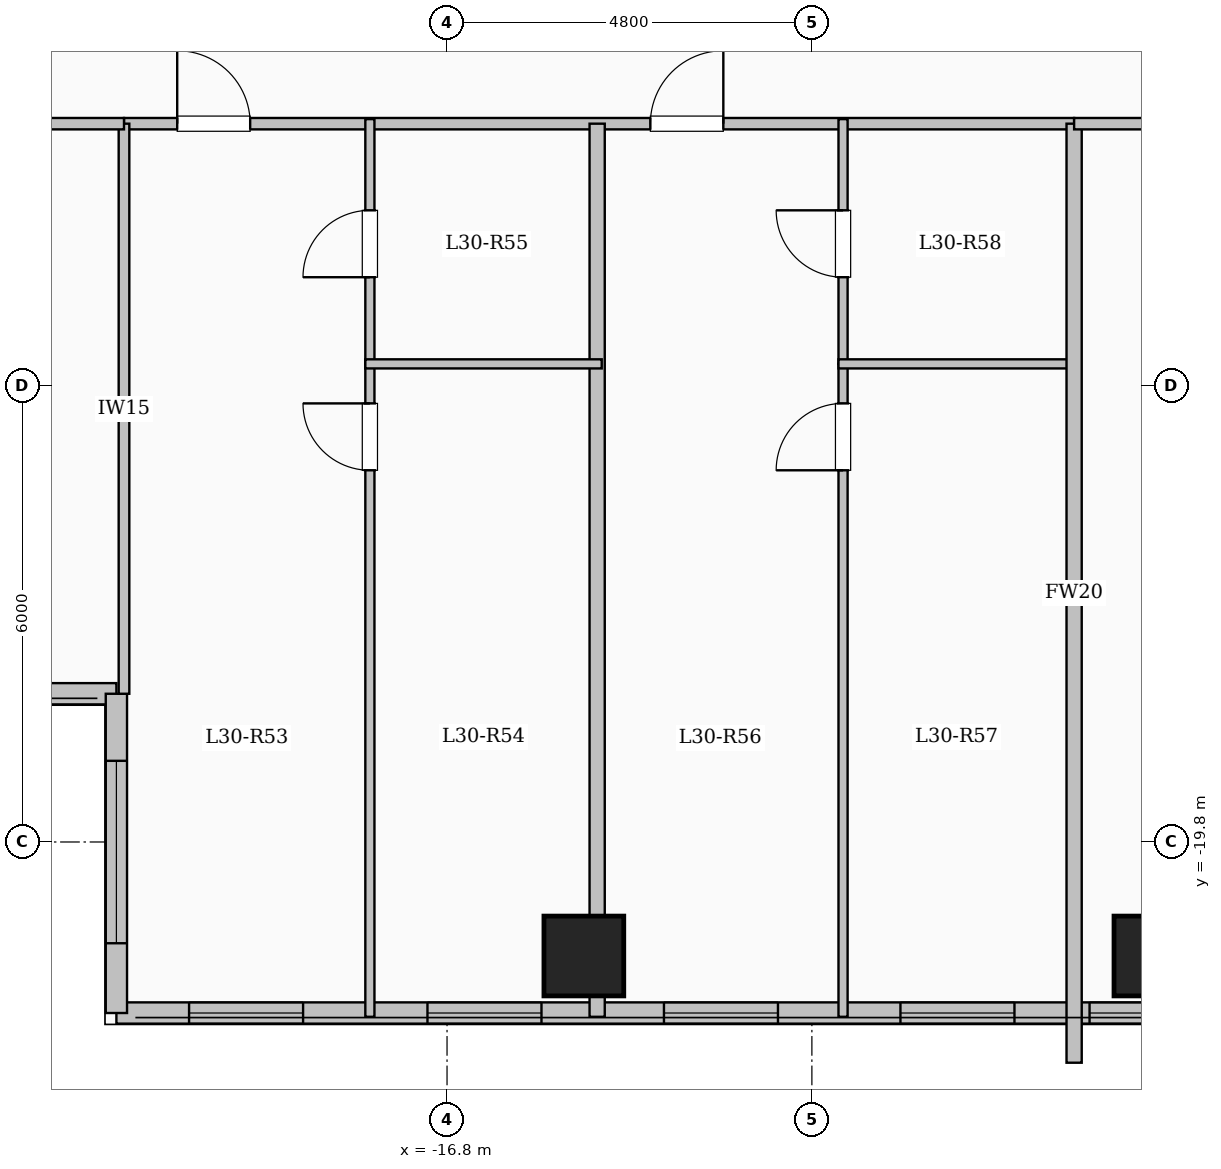
"""IFC4 building model, lengths in metres.
Left out: names, types, materials, properties, quantities, classifications, styles, units other than length and angle.
Written with IfcOpenShell. Run it as: python <this file> out.ifc"""

import sys

from ifc_helpers import new_model, si_unit, direction, frame, frame_2d, origin, origin_2d, place, context, subcontext, project, spatial, rectangle, extrude, element, fill, save


model = new_model("IFC4")
c1 = context("Model", 3, precision=1e-05, world=origin(), true_north=direction((0.0, 1.0)))
c2 = subcontext(c1, "Body", "Model", "MODEL_VIEW")
j1 = project(units=[si_unit("LENGTHUNIT", "METRE"), si_unit("PLANEANGLEUNIT", "RADIAN")], contexts=[c1])
p1 = place(None, origin())
s1 = spatial("IfcSite", under=j1, at=p1, CompositionType="ELEMENT")
p2 = place(p1, origin())
s2 = spatial("IfcBuilding", under=s1, at=p2, CompositionType="ELEMENT")
p3 = place(p2, frame((0.0, 0.0, 111.8)))
s3 = spatial("IfcBuildingStorey", under=s2, at=p3, CompositionType="ELEMENT", Elevation=111.8)
for number, where, z_axis, x_axis in (
    (1, (-15.0, -21.3, 0.0), (0.0, 0.0, 1.0), (1.0, 0.0, 0.0)),
    (2, (-7.5, -21.3, 0.0), (0.0, 0.0, 1.0), (1.0, 0.0, 0.0)),
):
    element("IfcColumn", number, at=place(p3, frame(where, z_axis=z_axis, x_axis=x_axis)), inside=s3, PredefinedType="COLUMN", context=c2, shape_type="SweptSolid", body=[
        extrude(rectangle(XDim=1.05, YDim=1.05, at=origin_2d()), origin(), (0.0, 0.0, 1.0), 3.35),
    ])
p4 = place(p3, frame((-21.15, -17.85, 0.0), z_axis=(0.0, 0.0, 1.0), x_axis=(-1.0, 0.0, 0.0)))
e3 = element("IfcWall", 3, at=p4, inside=s3, PredefinedType="SOLIDWALL", context=c2, shape_type="SweptSolid", body=[
    extrude(rectangle(XDim=5.7, YDim=0.28, at=frame_2d((2.85, 0.0))), origin(), (0.0, 0.0, 1.0), 3.1),
])
p5 = place(p4, frame((1.625, 0.0, 0.9)))
e4 = element("IfcOpeningElement", 4, at=p5, cuts=e3, PredefinedType="OPENING", context=c2, shape_type="SweptSolid", body=[
    extrude(rectangle(XDim=2.4, YDim=1.8, at=frame_2d((1.2, 0.9))), frame((0.0, 0.15, 0.0), z_axis=(0.0, -1.0, 0.0), x_axis=(1.0, 0.0, 0.0)), (0.0, 0.0, 1.0), 0.3),
])
p6 = place(p3, frame((-7.35, -22.05, 0.0), z_axis=(0.0, 0.0, 1.0), x_axis=(-1.0, 0.0, 0.0)))
e5 = element("IfcWall", 5, at=p6, inside=s3, PredefinedType="SOLIDWALL", context=c2, shape_type="SweptSolid", body=[
    extrude(rectangle(XDim=13.8, YDim=0.28, at=frame_2d((6.9, 0.0))), origin(), (0.0, 0.0, 1.0), 3.1),
])
p7 = place(p6, frame((0.147, 0.0, 0.95)))
e6 = element("IfcOpeningElement", 6, at=p7, cuts=e5, PredefinedType="OPENING", context=c2, shape_type="SweptSolid", body=[
    extrude(rectangle(XDim=0.85, YDim=1.5, at=frame_2d((0.425, 0.75))), frame((0.0, 0.15, 0.0), z_axis=(0.0, -1.0, 0.0), x_axis=(1.0, 0.0, 0.0)), (0.0, 0.0, 1.0), 0.3),
])
p8 = place(p6, frame((1.985, 0.0, 0.9)))
e7 = element("IfcOpeningElement", 7, at=p8, cuts=e5, PredefinedType="OPENING", context=c2, shape_type="SweptSolid", body=[
    extrude(rectangle(XDim=1.5, YDim=1.65, at=frame_2d((0.75, 0.825))), frame((0.0, 0.15, 0.0), z_axis=(0.0, -1.0, 0.0), x_axis=(1.0, 0.0, 0.0)), (0.0, 0.0, 1.0), 0.3),
])
p9 = place(p6, frame((5.096, 0.0, 0.9)))
e8 = element("IfcOpeningElement", 8, at=p9, cuts=e5, PredefinedType="OPENING", context=c2, shape_type="SweptSolid", body=[
    extrude(rectangle(XDim=1.5, YDim=1.65, at=frame_2d((0.75, 0.825))), frame((0.0, 0.15, 0.0), z_axis=(0.0, -1.0, 0.0), x_axis=(1.0, 0.0, 0.0)), (0.0, 0.0, 1.0), 0.3),
])
p10 = place(p6, frame((8.208, 0.0, 0.9)))
e9 = element("IfcOpeningElement", 9, at=p10, cuts=e5, PredefinedType="OPENING", context=c2, shape_type="SweptSolid", body=[
    extrude(rectangle(XDim=1.5, YDim=1.65, at=frame_2d((0.75, 0.825))), frame((0.0, 0.15, 0.0), z_axis=(0.0, -1.0, 0.0), x_axis=(1.0, 0.0, 0.0)), (0.0, 0.0, 1.0), 0.3),
])
p11 = place(p6, frame((11.344, 0.0, 0.9)))
e10 = element("IfcOpeningElement", 10, at=p11, cuts=e5, PredefinedType="OPENING", context=c2, shape_type="SweptSolid", body=[
    extrude(rectangle(XDim=1.5, YDim=1.65, at=frame_2d((0.75, 0.825))), frame((0.0, 0.15, 0.0), z_axis=(0.0, -1.0, 0.0), x_axis=(1.0, 0.0, 0.0)), (0.0, 0.0, 1.0), 0.3),
])
p12 = place(p3, frame((-21.15, -22.05, 0.0), z_axis=(0.0, 0.0, 1.0), x_axis=(0.0, 1.0, 0.0)))
e11 = element("IfcWall", 11, at=p12, inside=s3, PredefinedType="SOLIDWALL", context=c2, shape_type="SweptSolid", body=[
    extrude(rectangle(XDim=4.2, YDim=0.28, at=frame_2d((2.1, 0.0))), origin(), (0.0, 0.0, 1.0), 3.1),
])
p13 = place(p12, frame((0.918, 0.0, 0.9)))
e12 = element("IfcOpeningElement", 12, at=p13, cuts=e11, PredefinedType="OPENING", context=c2, shape_type="SweptSolid", body=[
    extrude(rectangle(XDim=2.4, YDim=1.8, at=frame_2d((1.2, 0.9))), frame((0.0, 0.15, 0.0), z_axis=(0.0, -1.0, 0.0), x_axis=(1.0, 0.0, 0.0)), (0.0, 0.0, 1.0), 0.3),
])
p14 = place(p3, frame((-21.05, -10.35, 0.0), z_axis=(0.0, 0.0, 1.0), x_axis=(1.0, 0.0, 0.0)))
e13 = element("IfcWall", 13, at=p14, inside=s3, PredefinedType="PARTITIONING", context=c2, shape_type="SweptSolid", body=[
    extrude(rectangle(XDim=12.5, YDim=0.15, at=frame_2d((6.25, 0.0))), origin(), (0.0, 0.0, 1.0), 3.1),
])
p15 = place(p14, frame((0.7, 0.0, 0.0)))
e14 = element("IfcOpeningElement", 14, at=p15, cuts=e13, PredefinedType="OPENING", context=c2, shape_type="SweptSolid", body=[
    extrude(rectangle(XDim=0.96, YDim=2.15, at=frame_2d((0.48, 1.075))), frame((0.0, 0.085, 0.0), z_axis=(0.0, -1.0, 0.0), x_axis=(1.0, 0.0, 0.0)), (0.0, 0.0, 1.0), 0.17),
])
p16 = place(p14, frame((6.925, 0.0, 0.0)))
e15 = element("IfcOpeningElement", 15, at=p16, cuts=e13, PredefinedType="OPENING", context=c2, shape_type="SweptSolid", body=[
    extrude(rectangle(XDim=0.96, YDim=2.15, at=frame_2d((0.48, 1.075))), frame((0.0, 0.085, 0.0), z_axis=(0.0, -1.0, 0.0), x_axis=(1.0, 0.0, 0.0)), (0.0, 0.0, 1.0), 0.17),
])
p17 = place(p3, frame((-14.825, -22.1, 0.0), z_axis=(0.0, 0.0, 1.0), x_axis=(0.0, 1.0, 0.0)))
e16 = element("IfcWall", 16, at=p17, inside=s3, PredefinedType="SOLIDWALL", context=c2, shape_type="SweptSolid", body=[
    extrude(rectangle(XDim=11.75, YDim=0.2, at=frame_2d((5.875, 0.0))), origin(), (0.0, 0.0, 1.0), 2.435),
])
p18 = place(p3, frame((-17.815, -22.1, 0.0), z_axis=(0.0, 0.0, 1.0), x_axis=(0.0, 1.0, 0.0)))
e17 = element("IfcWall", 17, at=p18, inside=s3, PredefinedType="PARTITIONING", context=c2, shape_type="SweptSolid", body=[
    extrude(rectangle(XDim=8.59, YDim=0.12, at=frame_2d((4.295, 0.0))), origin(), (0.0, 0.0, 1.0), 3.1),
])
p19 = place(p18, frame((7.19, 0.0, 0.0)))
e18 = element("IfcOpeningElement", 18, at=p19, cuts=e17, PredefinedType="OPENING", context=c2, shape_type="SweptSolid", body=[
    extrude(rectangle(XDim=0.88, YDim=2.1, at=frame_2d((0.44, 1.05))), frame((0.0, 0.07, 0.0), z_axis=(0.0, -1.0, 0.0), x_axis=(1.0, 0.0, 0.0)), (0.0, 0.0, 1.0), 0.14),
])
p20 = place(p3, frame((-17.815, -13.51, 0.0), z_axis=(0.0, 0.0, 1.0), x_axis=(0.0, 1.0, 0.0)))
e19 = element("IfcWall", 19, at=p20, inside=s3, PredefinedType="PARTITIONING", context=c2, shape_type="SweptSolid", body=[
    extrude(rectangle(XDim=3.22, YDim=0.12, at=frame_2d((1.61, 0.0))), origin(), (0.0, 0.0, 1.0), 3.1),
])
p21 = place(p20, frame((1.14, 0.0, 0.0)))
e20 = element("IfcOpeningElement", 20, at=p21, cuts=e19, PredefinedType="OPENING", context=c2, shape_type="SweptSolid", body=[
    extrude(rectangle(XDim=0.88, YDim=2.1, at=frame_2d((0.44, 1.05))), frame((0.0, 0.07, 0.0), z_axis=(0.0, -1.0, 0.0), x_axis=(1.0, 0.0, 0.0)), (0.0, 0.0, 1.0), 0.14),
])
p22 = place(p3, frame((-17.875, -13.51, 0.0), z_axis=(0.0, 0.0, 1.0), x_axis=(1.0, 0.0, 0.0)))
e21 = element("IfcWall", 21, at=p22, inside=s3, PredefinedType="PARTITIONING", context=c2, shape_type="SweptSolid", body=[
    extrude(rectangle(XDim=3.11, YDim=0.12, at=frame_2d((1.555, 0.0))), origin(), (0.0, 0.0, 1.0), 3.1),
])
p23 = place(p3, frame((-11.59, -22.1, 0.0), z_axis=(0.0, 0.0, 1.0), x_axis=(0.0, 1.0, 0.0)))
e22 = element("IfcWall", 22, at=p23, inside=s3, PredefinedType="PARTITIONING", context=c2, shape_type="SweptSolid", body=[
    extrude(rectangle(XDim=8.59, YDim=0.12, at=frame_2d((4.295, 0.0))), origin(), (0.0, 0.0, 1.0), 3.1),
])
p24 = place(p23, frame((7.19, 0.0, 0.0)))
e23 = element("IfcOpeningElement", 23, at=p24, cuts=e22, PredefinedType="OPENING", context=c2, shape_type="SweptSolid", body=[
    extrude(rectangle(XDim=0.88, YDim=2.1, at=frame_2d((0.44, 1.05))), frame((0.0, 0.07, 0.0), z_axis=(0.0, -1.0, 0.0), x_axis=(1.0, 0.0, 0.0)), (0.0, 0.0, 1.0), 0.14),
])
p25 = place(p3, frame((-11.59, -13.51, 0.0), z_axis=(0.0, 0.0, 1.0), x_axis=(0.0, 1.0, 0.0)))
e24 = element("IfcWall", 24, at=p25, inside=s3, PredefinedType="PARTITIONING", context=c2, shape_type="SweptSolid", body=[
    extrude(rectangle(XDim=3.22, YDim=0.12, at=frame_2d((1.61, 0.0))), origin(), (0.0, 0.0, 1.0), 3.1),
])
p26 = place(p25, frame((1.14, 0.0, 0.0)))
e25 = element("IfcOpeningElement", 25, at=p26, cuts=e24, PredefinedType="OPENING", context=c2, shape_type="SweptSolid", body=[
    extrude(rectangle(XDim=0.88, YDim=2.1, at=frame_2d((0.44, 1.05))), frame((0.0, 0.07, 0.0), z_axis=(0.0, -1.0, 0.0), x_axis=(1.0, 0.0, 0.0)), (0.0, 0.0, 1.0), 0.14),
])
p27 = place(p3, frame((-11.65, -13.51, 0.0), z_axis=(0.0, 0.0, 1.0), x_axis=(1.0, 0.0, 0.0)))
e26 = element("IfcWall", 26, at=p27, inside=s3, PredefinedType="PARTITIONING", context=c2, shape_type="SweptSolid", body=[
    extrude(rectangle(XDim=3.11, YDim=0.12, at=frame_2d((1.555, 0.0))), origin(), (0.0, 0.0, 1.0), 3.1),
])
p28 = place(p3, frame((-8.55, -22.704, 0.0), z_axis=(0.0, 0.0, 1.0), x_axis=(0.0, 1.0, 0.0)))
e27 = element("IfcWall", 27, at=p28, inside=s3, PredefinedType="SOLIDWALL", context=c2, shape_type="SweptSolid", body=[
    extrude(rectangle(XDim=12.354, YDim=0.2, at=frame_2d((6.177, 0.0))), origin(), (0.0, 0.0, 1.0), 3.1),
])
p29 = place(p3, frame((-8.55, -10.35, 0.0), z_axis=(0.0, 0.0, 1.0), x_axis=(1.0, 0.0, 0.0)))
e28 = element("IfcWall", 28, at=p29, inside=s3, PredefinedType="PARTITIONING", context=c2, shape_type="SweptSolid", body=[
    extrude(rectangle(XDim=17.1, YDim=0.15, at=frame_2d((8.55, 0.0))), origin(), (0.0, 0.0, 1.0), 3.1),
])
p30 = place(p29, frame((1.6, 0.0, 0.0)))
e29 = element("IfcOpeningElement", 29, at=p30, cuts=e28, PredefinedType="OPENING", context=c2, shape_type="SweptSolid", body=[
    extrude(rectangle(XDim=0.96, YDim=2.15, at=frame_2d((0.48, 1.075))), frame((0.0, 0.085, 0.0), z_axis=(0.0, -1.0, 0.0), x_axis=(1.0, 0.0, 0.0)), (0.0, 0.0, 1.0), 0.17),
])
p31 = place(p3, frame((-21.05, -17.85, 0.0), z_axis=(0.0, 0.0, 1.0), x_axis=(0.0, 1.0, 0.0)))
e30 = element("IfcWall", 30, at=p31, inside=s3, PredefinedType="PARTITIONING", context=c2, shape_type="SweptSolid", body=[
    extrude(rectangle(XDim=7.5, YDim=0.14, at=frame_2d((3.75, 0.0))), origin(), (0.0, 0.0, 1.0), 3.1),
])
p32 = place(p3, frame((-26.88, -10.35, 0.0), z_axis=(0.0, 0.0, 1.0), x_axis=(1.0, 0.0, 0.0)))
e31 = element("IfcWall", 31, at=p32, inside=s3, PredefinedType="PARTITIONING", context=c2, shape_type="SweptSolid", body=[
    extrude(rectangle(XDim=5.83, YDim=0.15, at=frame_2d((2.915, 0.0))), origin(), (0.0, 0.0, 1.0), 3.1),
])
p33 = place(p32, frame((2.44, 0.0, 0.0)))
e32 = element("IfcOpeningElement", 32, at=p33, cuts=e31, PredefinedType="OPENING", context=c2, shape_type="SweptSolid", body=[
    extrude(rectangle(XDim=0.95, YDim=2.15, at=frame_2d((0.475, 1.075))), frame((0.0, 0.085, 0.0), z_axis=(0.0, -1.0, 0.0), x_axis=(1.0, 0.0, 0.0)), (0.0, 0.0, 1.0), 0.17),
])
p34 = place(p7, origin())
e33 = element("IfcWindow", 33, at=p34, inside=s3, PartitioningType="SINGLE_PANEL", PredefinedType="WINDOW", context=c2, shape_type="SweptSolid", body=[
    extrude(rectangle(XDim=0.85, YDim=1.5, at=frame_2d((0.425, 0.75))), frame((0.0, 0.03, 0.0), z_axis=(0.0, -1.0, 0.0), x_axis=(1.0, 0.0, 0.0)), (0.0, 0.0, 1.0), 0.06),
])
fill(e6, e33)
p35 = place(p8, origin())
e34 = element("IfcWindow", 34, at=p35, inside=s3, PartitioningType="SINGLE_PANEL", PredefinedType="WINDOW", context=c2, shape_type="SweptSolid", body=[
    extrude(rectangle(XDim=1.5, YDim=1.65, at=frame_2d((0.75, 0.825))), frame((0.0, 0.03, 0.0), z_axis=(0.0, -1.0, 0.0), x_axis=(1.0, 0.0, 0.0)), (0.0, 0.0, 1.0), 0.06),
])
fill(e7, e34)
p36 = place(p9, origin())
e35 = element("IfcWindow", 35, at=p36, inside=s3, PartitioningType="SINGLE_PANEL", PredefinedType="WINDOW", context=c2, shape_type="SweptSolid", body=[
    extrude(rectangle(XDim=1.5, YDim=1.65, at=frame_2d((0.75, 0.825))), frame((0.0, 0.03, 0.0), z_axis=(0.0, -1.0, 0.0), x_axis=(1.0, 0.0, 0.0)), (0.0, 0.0, 1.0), 0.06),
])
fill(e8, e35)
p37 = place(p10, origin())
e36 = element("IfcWindow", 36, at=p37, inside=s3, PartitioningType="SINGLE_PANEL", PredefinedType="WINDOW", context=c2, shape_type="SweptSolid", body=[
    extrude(rectangle(XDim=1.5, YDim=1.65, at=frame_2d((0.75, 0.825))), frame((0.0, 0.03, 0.0), z_axis=(0.0, -1.0, 0.0), x_axis=(1.0, 0.0, 0.0)), (0.0, 0.0, 1.0), 0.06),
])
fill(e9, e36)
p38 = place(p11, origin())
e37 = element("IfcWindow", 37, at=p38, inside=s3, PartitioningType="SINGLE_PANEL", PredefinedType="WINDOW", context=c2, shape_type="SweptSolid", body=[
    extrude(rectangle(XDim=1.5, YDim=1.65, at=frame_2d((0.75, 0.825))), frame((0.0, 0.03, 0.0), z_axis=(0.0, -1.0, 0.0), x_axis=(1.0, 0.0, 0.0)), (0.0, 0.0, 1.0), 0.06),
])
fill(e10, e37)
p39 = place(p13, origin())
e38 = element("IfcWindow", 38, at=p39, inside=s3, PartitioningType="SINGLE_PANEL", PredefinedType="WINDOW", context=c2, shape_type="SweptSolid", body=[
    extrude(rectangle(XDim=2.4, YDim=1.8, at=frame_2d((1.2, 0.9))), frame((0.0, 0.03, 0.0), z_axis=(0.0, -1.0, 0.0), x_axis=(1.0, 0.0, 0.0)), (0.0, 0.0, 1.0), 0.06),
])
fill(e12, e38)
p40 = place(p15, origin())
e39 = element("IfcDoor", 39, at=p40, inside=s3, OperationType="SINGLE_SWING_LEFT", PredefinedType="DOOR", context=c2, shape_type="SweptSolid", body=[
    extrude(rectangle(XDim=0.96, YDim=2.15, at=frame_2d((0.48, 1.075))), frame((0.0, 0.025, 0.0), z_axis=(0.0, -1.0, 0.0), x_axis=(1.0, 0.0, 0.0)), (0.0, 0.0, 1.0), 0.05),
])
fill(e14, e39)
p41 = place(p19, origin())
e40 = element("IfcDoor", 40, at=p41, inside=s3, OperationType="SINGLE_SWING_RIGHT", PredefinedType="DOOR", context=c2, shape_type="SweptSolid", body=[
    extrude(rectangle(XDim=0.88, YDim=2.1, at=frame_2d((0.44, 1.05))), frame((0.0, 0.025, 0.0), z_axis=(0.0, -1.0, 0.0), x_axis=(1.0, 0.0, 0.0)), (0.0, 0.0, 1.0), 0.05),
])
fill(e18, e40)
p42 = place(p21, origin())
e41 = element("IfcDoor", 41, at=p42, inside=s3, OperationType="SINGLE_SWING_LEFT", PredefinedType="DOOR", context=c2, shape_type="SweptSolid", body=[
    extrude(rectangle(XDim=0.88, YDim=2.1, at=frame_2d((0.44, 1.05))), frame((0.0, 0.025, 0.0), z_axis=(0.0, -1.0, 0.0), x_axis=(1.0, 0.0, 0.0)), (0.0, 0.0, 1.0), 0.05),
])
fill(e20, e41)
p43 = place(p16, origin())
e42 = element("IfcDoor", 42, at=p43, inside=s3, OperationType="SINGLE_SWING_RIGHT", PredefinedType="DOOR", context=c2, shape_type="SweptSolid", body=[
    extrude(rectangle(XDim=0.96, YDim=2.15, at=frame_2d((0.48, 1.075))), frame((0.0, 0.025, 0.0), z_axis=(0.0, -1.0, 0.0), x_axis=(1.0, 0.0, 0.0)), (0.0, 0.0, 1.0), 0.05),
])
fill(e15, e42)
p44 = place(p24, origin())
e43 = element("IfcDoor", 43, at=p44, inside=s3, OperationType="SINGLE_SWING_LEFT", PredefinedType="DOOR", context=c2, shape_type="SweptSolid", body=[
    extrude(rectangle(XDim=0.88, YDim=2.1, at=frame_2d((0.44, 1.05))), frame((0.0, 0.025, 0.0), z_axis=(0.0, -1.0, 0.0), x_axis=(1.0, 0.0, 0.0)), (0.0, 0.0, 1.0), 0.05),
])
fill(e23, e43)
p45 = place(p26, origin())
e44 = element("IfcDoor", 44, at=p45, inside=s3, OperationType="SINGLE_SWING_RIGHT", PredefinedType="DOOR", context=c2, shape_type="SweptSolid", body=[
    extrude(rectangle(XDim=0.88, YDim=2.1, at=frame_2d((0.44, 1.05))), frame((0.0, 0.025, 0.0), z_axis=(0.0, -1.0, 0.0), x_axis=(1.0, 0.0, 0.0)), (0.0, 0.0, 1.0), 0.05),
])
fill(e25, e44)
save(model, sys.argv[1])
